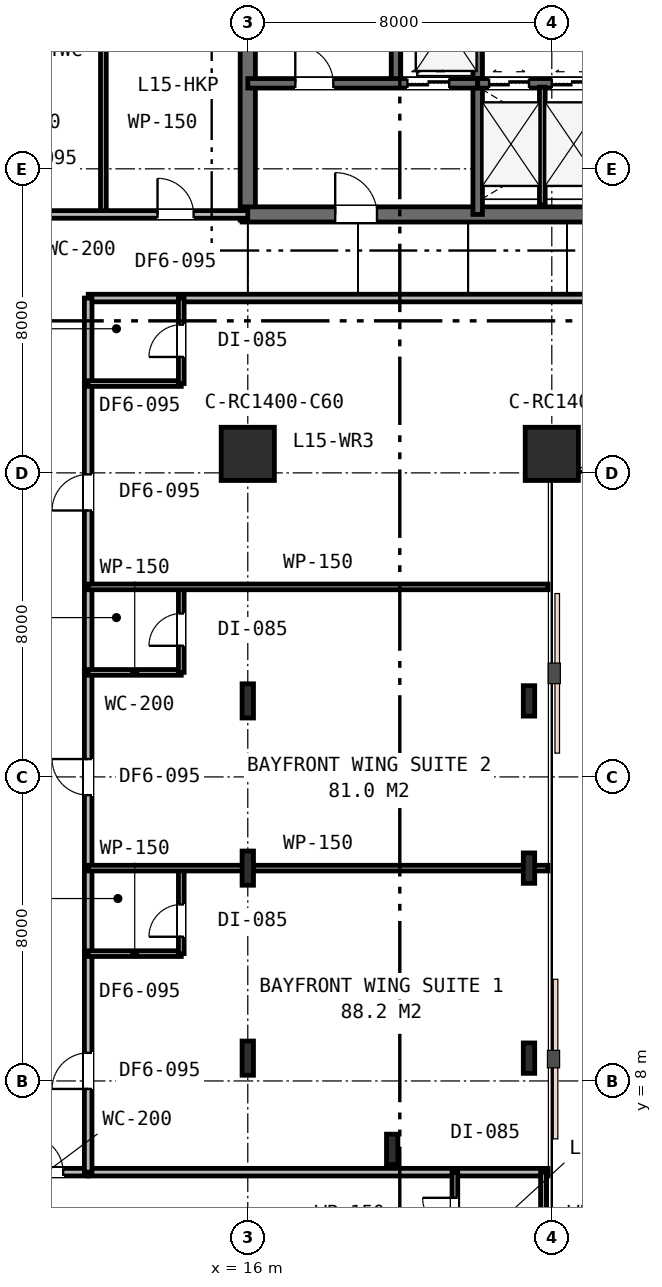
"""IFC4 building model, lengths in metres.
Left out: names, types, materials, properties, quantities, classifications, styles, units other than length and angle.
Written with IfcOpenShell. Run it as: python <this file> out.ifc"""

import sys

from ifc_helpers import new_model, si_unit, direction, frame, frame_2d, origin, origin_2d, place, context, subcontext, project, spatial, rectangle, i_section, extrude, element, fill, save


model = new_model("IFC4")
c1 = context("Model", 3, precision=1e-05, world=origin(), true_north=direction((0.0, 1.0)))
c2 = subcontext(c1, "Body", "Model", "MODEL_VIEW")
j1 = project(units=[si_unit("LENGTHUNIT", "METRE"), si_unit("PLANEANGLEUNIT", "RADIAN")], contexts=[c1])
p1 = place(None, origin())
s1 = spatial("IfcSite", under=j1, at=p1, CompositionType="ELEMENT")
p2 = place(p1, origin())
s2 = spatial("IfcBuilding", under=s1, at=p2, CompositionType="ELEMENT")
p3 = place(p2, frame((0.0, 0.0, 61.8)))
s3 = spatial("IfcBuildingStorey", under=s2, at=p3, CompositionType="ELEMENT", Elevation=61.8)
p4 = place(p3, frame((16.0, 30.65, 0.0), z_axis=(0.0, 0.0, 1.0), x_axis=(0.0, 1.0, 0.0)))
e1 = element("IfcWall", 1, at=p4, inside=s3, PredefinedType="SHEAR", context=c2, shape_type="SweptSolid", body=[
    extrude(rectangle(XDim=12.3, YDim=0.4, at=frame_2d((6.15, 0.0))), origin(), (0.0, 0.0, 1.0), 3.6),
])
p5 = place(p3, frame((15.85, 30.8, 0.0), z_axis=(0.0, 0.0, 1.0), x_axis=(1.0, 0.0, 0.0)))
e2 = element("IfcWall", 2, at=p5, inside=s3, PredefinedType="SHEAR", context=c2, shape_type="SweptSolid", body=[
    extrude(rectangle(XDim=11.2, YDim=0.4, at=frame_2d((5.6, 0.0))), origin(), (0.0, 0.0, 1.0), 3.6),
])
p6 = place(p5, frame((2.45, 0.0, 0.0)))
e3 = element("IfcOpeningElement", 3, at=p6, cuts=e2, PredefinedType="OPENING", context=c2, shape_type="SweptSolid", body=[
    extrude(rectangle(XDim=1.1, YDim=2.15, at=frame_2d((0.55, 1.075))), frame((0.0, 0.21, 0.0), z_axis=(0.0, -1.0, 0.0), x_axis=(1.0, 0.0, 0.0)), (0.0, 0.0, 1.0), 0.42),
])
p7 = place(p3, frame((19.9, 34.25, 0.0), z_axis=(0.0, 0.0, 1.0), x_axis=(0.0, 1.0, 0.0)))
e4 = element("IfcWall", 4, at=p7, inside=s3, PredefinedType="SHEAR", context=c2, shape_type="SweptSolid", body=[
    extrude(rectangle(XDim=8.65, YDim=0.25, at=frame_2d((4.325, 0.0))), origin(), (0.0, 0.0, 1.0), 3.6),
])
p8 = place(p3, frame((22.05, 30.8, 0.0), z_axis=(0.0, 0.0, 1.0), x_axis=(0.0, 1.0, 0.0)))
e5 = element("IfcWall", 5, at=p8, inside=s3, PredefinedType="SHEAR", context=c2, shape_type="SweptSolid", body=[
    extrude(rectangle(XDim=6.45, YDim=0.25, at=frame_2d((3.225, 0.0))), origin(), (0.0, 0.0, 1.0), 3.6),
])
p9 = place(p3, frame((16.0, 34.25, 0.0), z_axis=(0.0, 0.0, 1.0), x_axis=(1.0, 0.0, 0.0)))
e6 = element("IfcWall", 6, at=p9, inside=s3, PredefinedType="SHEAR", context=c2, shape_type="SweptSolid", body=[
    extrude(rectangle(XDim=6.05, YDim=0.25, at=frame_2d((3.025, 0.0))), origin(), (0.0, 0.0, 1.0), 3.6),
])
p10 = place(p9, frame((1.25, 0.0, 0.0)))
e7 = element("IfcOpeningElement", 7, at=p10, cuts=e6, PredefinedType="OPENING", context=c2, shape_type="SweptSolid", body=[
    extrude(rectangle(XDim=1.0, YDim=2.15, at=frame_2d((0.5, 1.075))), frame((0.0, 0.135, 0.0), z_axis=(0.0, -1.0, 0.0), x_axis=(1.0, 0.0, 0.0)), (0.0, 0.0, 1.0), 0.27),
])
p11 = place(p9, frame((4.2, 0.0, 0.0)))
e8 = element("IfcOpeningElement", 8, at=p11, cuts=e6, PredefinedType="OPENING", context=c2, shape_type="SweptSolid", body=[
    extrude(rectangle(XDim=1.1, YDim=2.15, at=frame_2d((0.55, 1.075))), frame((0.0, 0.135, 0.0), z_axis=(0.0, -1.0, 0.0), x_axis=(1.0, 0.0, 0.0)), (0.0, 0.0, 1.0), 0.27),
])
p12 = place(p3, frame((22.05, 34.25, 0.0), z_axis=(0.0, 0.0, 1.0), x_axis=(1.0, 0.0, 0.0)))
e9 = element("IfcWall", 9, at=p12, inside=s3, PredefinedType="SHEAR", context=c2, shape_type="SweptSolid", body=[
    extrude(rectangle(XDim=5.0, YDim=0.25, at=frame_2d((2.5, 0.0))), origin(), (0.0, 0.0, 1.0), 3.6),
])
p13 = place(p12, frame((0.3, 0.0, 0.0)))
e10 = element("IfcOpeningElement", 10, at=p13, cuts=e9, PredefinedType="OPENING", context=c2, shape_type="SweptSolid", body=[
    extrude(rectangle(XDim=1.05, YDim=2.15, at=frame_2d((0.525, 1.075))), frame((0.0, 0.135, 0.0), z_axis=(0.0, -1.0, 0.0), x_axis=(1.0, 0.0, 0.0)), (0.0, 0.0, 1.0), 0.27),
])
p14 = place(p12, frame((1.95, 0.0, 0.0)))
e11 = element("IfcOpeningElement", 11, at=p14, cuts=e9, PredefinedType="OPENING", context=c2, shape_type="SweptSolid", body=[
    extrude(rectangle(XDim=1.05, YDim=2.15, at=frame_2d((0.525, 1.075))), frame((0.0, 0.135, 0.0), z_axis=(0.0, -1.0, 0.0), x_axis=(1.0, 0.0, 0.0)), (0.0, 0.0, 1.0), 0.27),
])
p15 = place(p12, frame((3.6, 0.0, 0.0)))
e12 = element("IfcOpeningElement", 12, at=p15, cuts=e9, PredefinedType="OPENING", context=c2, shape_type="SweptSolid", body=[
    extrude(rectangle(XDim=1.05, YDim=2.15, at=frame_2d((0.525, 1.075))), frame((0.0, 0.135, 0.0), z_axis=(0.0, -1.0, 0.0), x_axis=(1.0, 0.0, 0.0)), (0.0, 0.0, 1.0), 0.27),
])
for number, where, z_axis, x_axis in (
    (13, (16.0, 24.5, 0.0), (0.0, 0.0, 1.0), (1.0, 0.0, 0.0)),
    (14, (24.0, 24.5, 0.0), (0.0, 0.0, 1.0), (1.0, 0.0, 0.0)),
):
    element("IfcColumn", number, at=place(p3, frame(where, z_axis=z_axis, x_axis=x_axis)), inside=s3, PredefinedType="COLUMN", context=c2, shape_type="SweptSolid", body=[
        extrude(rectangle(XDim=1.4, YDim=1.4, at=origin_2d()), origin(), (0.0, 0.0, 1.0), 3.6),
    ])
for number, where, z_axis, x_axis in (
    (15, (19.8, 6.2, 0.0), (0.0, 0.0, 1.0), (1.0, 0.0, 0.0)),
    (16, (23.4, 8.6, 0.0), (0.0, 0.0, 1.0), (1.0, 0.0, 0.0)),
    (17, (23.4, 13.6, 0.0), (0.0, 0.0, 1.0), (1.0, 0.0, 0.0)),
    (18, (23.4, 18.0, 0.0), (0.0, 0.0, 1.0), (1.0, 0.0, 0.0)),
):
    element("IfcColumn", number, at=place(p3, frame(where, z_axis=z_axis, x_axis=x_axis)), inside=s3, PredefinedType="COLUMN", context=c2, shape_type="SweptSolid", body=[
        extrude(i_section(OverallWidth=0.3, OverallDepth=0.8, WebThickness=0.018, FlangeThickness=0.033, FilletRadius=0.03, at=origin_2d()), origin(), (0.0, 0.0, 1.0), 3.6),
    ])
for number, where, z_axis, x_axis in (
    (19, (16.0, 8.6, 0.0), (0.0, 0.0, 1.0), (1.0, 0.0, 0.0)),
    (20, (16.0, 13.6, 0.0), (0.0, 0.0, 1.0), (1.0, 0.0, 0.0)),
    (21, (16.0, 18.0, 0.0), (0.0, 0.0, 1.0), (1.0, 0.0, 0.0)),
):
    element("IfcColumn", number, at=place(p3, frame(where, z_axis=z_axis, x_axis=x_axis)), inside=s3, PredefinedType="COLUMN", context=c2, shape_type="SweptSolid", body=[
        extrude(i_section(OverallWidth=0.3, OverallDepth=0.9, WebThickness=0.018, FlangeThickness=0.035, FilletRadius=0.03, at=origin_2d()), origin(), (0.0, 0.0, 1.0), 3.6),
    ])
p16 = place(p3, frame((23.75, 31.05, 0.0), z_axis=(0.0, 0.0, 1.0), x_axis=(0.0, 1.0, 0.0)))
e22 = element("IfcWall", 22, at=p16, inside=s3, PredefinedType="PLUMBINGWALL", context=c2, shape_type="SweptSolid", body=[
    extrude(rectangle(XDim=3.1, YDim=0.15, at=frame_2d((1.55, 0.0))), origin(), (0.0, 0.0, 1.0), 3.33),
])
p17 = place(p3, frame((11.8, 28.6, 0.0), z_axis=(0.0, 0.0, 1.0), x_axis=(1.0, 0.0, 0.0)))
e23 = element("IfcWall", 23, at=p17, inside=s3, PredefinedType="PARTITIONING", context=c2, shape_type="SweptSolid", body=[
    extrude(rectangle(XDim=38.6, YDim=0.2, at=frame_2d((19.3, 0.0))), origin(), (0.0, 0.0, 1.0), 2.82),
])
p18 = place(p17, frame((14.3, 0.0, 0.0)))
e24 = element("IfcOpeningElement", 24, at=p18, cuts=e23, PredefinedType="OPENING", context=c2, shape_type="SweptSolid", body=[
    extrude(rectangle(XDim=0.95, YDim=2.15, at=frame_2d((0.475, 1.075))), frame((0.0, 0.11, 0.0), z_axis=(0.0, -1.0, 0.0), x_axis=(1.0, 0.0, 0.0)), (0.0, 0.0, 1.0), 0.22),
])
p19 = place(p17, frame((22.075, 0.0, 0.0)))
e25 = element("IfcOpeningElement", 25, at=p19, cuts=e23, PredefinedType="OPENING", context=c2, shape_type="SweptSolid", body=[
    extrude(rectangle(XDim=0.95, YDim=2.15, at=frame_2d((0.475, 1.075))), frame((0.0, 0.11, 0.0), z_axis=(0.0, -1.0, 0.0), x_axis=(1.0, 0.0, 0.0)), (0.0, 0.0, 1.0), 0.22),
])
p20 = place(p17, frame((28.829, 0.0, 0.0)))
e26 = element("IfcOpeningElement", 26, at=p20, cuts=e23, PredefinedType="OPENING", context=c2, shape_type="SweptSolid", body=[
    extrude(rectangle(XDim=0.95, YDim=2.15, at=frame_2d((0.475, 1.075))), frame((0.0, 0.11, 0.0), z_axis=(0.0, -1.0, 0.0), x_axis=(1.0, 0.0, 0.0)), (0.0, 0.0, 1.0), 0.22),
])
p21 = place(p17, frame((34.669, 0.0, 0.0)))
e27 = element("IfcOpeningElement", 27, at=p21, cuts=e23, PredefinedType="OPENING", context=c2, shape_type="SweptSolid", body=[
    extrude(rectangle(XDim=0.95, YDim=2.15, at=frame_2d((0.475, 1.075))), frame((0.0, 0.11, 0.0), z_axis=(0.0, -1.0, 0.0), x_axis=(1.0, 0.0, 0.0)), (0.0, 0.0, 1.0), 0.22),
])
p22 = place(p3, frame((12.2, 30.8, 0.0), z_axis=(0.0, 0.0, 1.0), x_axis=(0.0, 1.0, 0.0)))
e28 = element("IfcWall", 28, at=p22, inside=s3, PredefinedType="PARTITIONING", context=c2, shape_type="SweptSolid", body=[
    extrude(rectangle(XDim=4.8, YDim=0.15, at=frame_2d((2.4, 0.0))), origin(), (0.0, 0.0, 1.0), 2.82),
])
p23 = place(p3, frame((8.3, 30.8, 0.0), z_axis=(0.0, 0.0, 1.0), x_axis=(1.0, 0.0, 0.0)))
e29 = element("IfcWall", 29, at=p23, inside=s3, PredefinedType="PARTITIONING", context=c2, shape_type="SweptSolid", body=[
    extrude(rectangle(XDim=7.7, YDim=0.2, at=frame_2d((3.85, 0.0))), origin(), (0.0, 0.0, 1.0), 2.82),
])
p24 = place(p23, frame((5.325, 0.0, 0.0)))
e30 = element("IfcOpeningElement", 30, at=p24, cuts=e29, PredefinedType="OPENING", context=c2, shape_type="SweptSolid", body=[
    extrude(rectangle(XDim=0.95, YDim=2.15, at=frame_2d((0.475, 1.075))), frame((0.0, 0.11, 0.0), z_axis=(0.0, -1.0, 0.0), x_axis=(1.0, 0.0, 0.0)), (0.0, 0.0, 1.0), 0.22),
])
p25 = place(p3, frame((11.8, 5.6, 0.0), z_axis=(0.0, 0.0, 1.0), x_axis=(1.0, 0.0, 0.0)))
e31 = element("IfcWall", 31, at=p25, inside=s3, PredefinedType="PARTITIONING", context=c2, shape_type="SweptSolid", body=[
    extrude(rectangle(XDim=12.1, YDim=0.2, at=frame_2d((6.05, 0.0))), origin(), (0.0, 0.0, 1.0), 2.82),
])
p26 = place(p3, frame((9.6, 5.6, 0.0), z_axis=(0.0, 0.0, 1.0), x_axis=(1.0, 0.0, 0.0)))
e32 = element("IfcWall", 32, at=p26, inside=s3, PredefinedType="PARTITIONING", context=c2, shape_type="SweptSolid", body=[
    extrude(rectangle(XDim=2.2, YDim=0.2, at=frame_2d((1.1, 0.0))), origin(), (0.0, 0.0, 1.0), 3.33),
])
p27 = place(p26, frame((0.593, 0.0, 0.0)))
e33 = element("IfcOpeningElement", 33, at=p27, cuts=e32, PredefinedType="OPENING", context=c2, shape_type="SweptSolid", body=[
    extrude(rectangle(XDim=0.95, YDim=2.15, at=frame_2d((0.475, 1.075))), frame((0.0, 0.11, 0.0), z_axis=(0.0, -1.0, 0.0), x_axis=(1.0, 0.0, 0.0)), (0.0, 0.0, 1.0), 0.22),
])
p28 = place(p3, frame((21.45, 3.4, 0.0), z_axis=(0.0, 0.0, 1.0), x_axis=(0.0, 1.0, 0.0)))
e34 = element("IfcWall", 34, at=p28, inside=s3, PredefinedType="PARTITIONING", context=c2, shape_type="SweptSolid", body=[
    extrude(rectangle(XDim=2.2, YDim=0.15, at=frame_2d((1.1, 0.0))), origin(), (0.0, 0.0, 1.0), 3.33),
])
p29 = place(p28, frame((0.675, 0.0, 0.0)))
e35 = element("IfcOpeningElement", 35, at=p29, cuts=e34, PredefinedType="OPENING", context=c2, shape_type="SweptSolid", body=[
    extrude(rectangle(XDim=0.85, YDim=2.15, at=frame_2d((0.425, 1.075))), frame((0.0, 0.085, 0.0), z_axis=(0.0, -1.0, 0.0), x_axis=(1.0, 0.0, 0.0)), (0.0, 0.0, 1.0), 0.17),
])
p30 = place(p3, frame((23.78, 5.6, 0.0), z_axis=(0.0, 0.0, 1.0), x_axis=(0.0, -1.0, 0.0)))
e36 = element("IfcWall", 36, at=p30, inside=s3, PredefinedType="PARTITIONING", context=c2, shape_type="SweptSolid", body=[
    extrude(rectangle(XDim=2.22, YDim=0.15, at=frame_2d((1.11, 0.0))), origin(), (0.0, 0.0, 1.0), 3.33),
])
p31 = place(p3, frame((11.8, 5.6, 0.0), z_axis=(0.0, 0.0, 1.0), x_axis=(0.0, 1.0, 0.0)))
e37 = element("IfcWall", 37, at=p31, inside=s3, PredefinedType="PARTITIONING", context=c2, shape_type="SweptSolid", body=[
    extrude(rectangle(XDim=23.0, YDim=0.2, at=frame_2d((11.5, 0.0))), origin(), (0.0, 0.0, 1.0), 2.82),
])
p32 = place(p31, frame((2.19, 0.0, 0.0)))
e38 = element("IfcOpeningElement", 38, at=p32, cuts=e37, PredefinedType="OPENING", context=c2, shape_type="SweptSolid", body=[
    extrude(rectangle(XDim=0.95, YDim=2.15, at=frame_2d((0.475, 1.075))), frame((0.0, 0.11, 0.0), z_axis=(0.0, -1.0, 0.0), x_axis=(1.0, 0.0, 0.0)), (0.0, 0.0, 1.0), 0.22),
])
p33 = place(p31, frame((9.92, 0.0, 0.0)))
e39 = element("IfcOpeningElement", 39, at=p33, cuts=e37, PredefinedType="OPENING", context=c2, shape_type="SweptSolid", body=[
    extrude(rectangle(XDim=0.95, YDim=2.15, at=frame_2d((0.475, 1.075))), frame((0.0, 0.11, 0.0), z_axis=(0.0, -1.0, 0.0), x_axis=(1.0, 0.0, 0.0)), (0.0, 0.0, 1.0), 0.22),
])
p34 = place(p31, frame((17.41, 0.0, 0.0)))
e40 = element("IfcOpeningElement", 40, at=p34, cuts=e37, PredefinedType="OPENING", context=c2, shape_type="SweptSolid", body=[
    extrude(rectangle(XDim=0.95, YDim=2.15, at=frame_2d((0.475, 1.075))), frame((0.0, 0.11, 0.0), z_axis=(0.0, -1.0, 0.0), x_axis=(1.0, 0.0, 0.0)), (0.0, 0.0, 1.0), 0.22),
])
p35 = place(p3, frame((11.8, 11.35, 0.0), z_axis=(0.0, 0.0, 1.0), x_axis=(1.0, 0.0, 0.0)))
e41 = element("IfcWall", 41, at=p35, inside=s3, PredefinedType="PARTITIONING", context=c2, shape_type="SweptSolid", body=[
    extrude(rectangle(XDim=2.45, YDim=0.15, at=frame_2d((1.225, 0.0))), origin(), (0.0, 0.0, 1.0), 2.96),
])
p36 = place(p3, frame((14.25, 11.35, 0.0), z_axis=(0.0, 0.0, 1.0), x_axis=(0.0, 1.0, 0.0)))
e42 = element("IfcWall", 42, at=p36, inside=s3, PredefinedType="PARTITIONING", context=c2, shape_type="SweptSolid", body=[
    extrude(rectangle(XDim=2.25, YDim=0.15, at=frame_2d((1.125, 0.0))), origin(), (0.0, 0.0, 1.0), 2.82),
])
p37 = place(p36, frame((0.444, 0.0, 0.0)))
e43 = element("IfcOpeningElement", 43, at=p37, cuts=e42, PredefinedType="OPENING", context=c2, shape_type="SweptSolid", body=[
    extrude(rectangle(XDim=0.85, YDim=2.15, at=frame_2d((0.425, 1.075))), frame((0.0, 0.085, 0.0), z_axis=(0.0, -1.0, 0.0), x_axis=(1.0, 0.0, 0.0)), (0.0, 0.0, 1.0), 0.17),
])
p38 = place(p3, frame((11.8, 13.6, 0.0), z_axis=(0.0, 0.0, 1.0), x_axis=(1.0, 0.0, 0.0)))
e44 = element("IfcWall", 44, at=p38, inside=s3, PredefinedType="PARTITIONING", context=c2, shape_type="SweptSolid", body=[
    extrude(rectangle(XDim=12.1, YDim=0.15, at=frame_2d((6.05, 0.0))), origin(), (0.0, 0.0, 1.0), 2.82),
])
p39 = place(p3, frame((11.8, 18.75, 0.0), z_axis=(0.0, 0.0, 1.0), x_axis=(1.0, 0.0, 0.0)))
e45 = element("IfcWall", 45, at=p39, inside=s3, PredefinedType="PARTITIONING", context=c2, shape_type="SweptSolid", body=[
    extrude(rectangle(XDim=2.45, YDim=0.15, at=frame_2d((1.225, 0.0))), origin(), (0.0, 0.0, 1.0), 3.33),
])
p40 = place(p3, frame((14.25, 18.75, 0.0), z_axis=(0.0, 0.0, 1.0), x_axis=(0.0, 1.0, 0.0)))
e46 = element("IfcWall", 46, at=p40, inside=s3, PredefinedType="PARTITIONING", context=c2, shape_type="SweptSolid", body=[
    extrude(rectangle(XDim=2.25, YDim=0.15, at=frame_2d((1.125, 0.0))), origin(), (0.0, 0.0, 1.0), 3.33),
])
p41 = place(p40, frame((0.7, 0.0, 0.0)))
e47 = element("IfcOpeningElement", 47, at=p41, cuts=e46, PredefinedType="OPENING", context=c2, shape_type="SweptSolid", body=[
    extrude(rectangle(XDim=0.85, YDim=2.15, at=frame_2d((0.425, 1.075))), frame((0.0, 0.085, 0.0), z_axis=(0.0, -1.0, 0.0), x_axis=(1.0, 0.0, 0.0)), (0.0, 0.0, 1.0), 0.17),
])
p42 = place(p3, frame((11.8, 21.0, 0.0), z_axis=(0.0, 0.0, 1.0), x_axis=(1.0, 0.0, 0.0)))
e48 = element("IfcWall", 48, at=p42, inside=s3, PredefinedType="PARTITIONING", context=c2, shape_type="SweptSolid", body=[
    extrude(rectangle(XDim=12.1, YDim=0.15, at=frame_2d((6.05, 0.0))), origin(), (0.0, 0.0, 1.0), 2.82),
])
p43 = place(p3, frame((11.8, 26.35, 0.0), z_axis=(0.0, 0.0, 1.0), x_axis=(1.0, 0.0, 0.0)))
e49 = element("IfcWall", 49, at=p43, inside=s3, PredefinedType="PARTITIONING", context=c2, shape_type="SweptSolid", body=[
    extrude(rectangle(XDim=2.45, YDim=0.15, at=frame_2d((1.225, 0.0))), origin(), (0.0, 0.0, 1.0), 3.33),
])
p44 = place(p3, frame((14.25, 26.35, 0.0), z_axis=(0.0, 0.0, 1.0), x_axis=(0.0, 1.0, 0.0)))
e50 = element("IfcWall", 50, at=p44, inside=s3, PredefinedType="PARTITIONING", context=c2, shape_type="SweptSolid", body=[
    extrude(rectangle(XDim=2.25, YDim=0.15, at=frame_2d((1.125, 0.0))), origin(), (0.0, 0.0, 1.0), 3.33),
])
p45 = place(p44, frame((0.7, 0.0, 0.0)))
e51 = element("IfcOpeningElement", 51, at=p45, cuts=e50, PredefinedType="OPENING", context=c2, shape_type="SweptSolid", body=[
    extrude(rectangle(XDim=0.85, YDim=2.15, at=frame_2d((0.425, 1.075))), frame((0.0, 0.085, 0.0), z_axis=(0.0, -1.0, 0.0), x_axis=(1.0, 0.0, 0.0)), (0.0, 0.0, 1.0), 0.17),
])
p46 = place(p10, origin())
e52 = element("IfcDoor", 52, at=p46, inside=s3, OperationType="SINGLE_SWING_LEFT", PredefinedType="DOOR", context=c2, shape_type="SweptSolid", body=[
    extrude(rectangle(XDim=1.0, YDim=2.15, at=frame_2d((0.5, 1.075))), frame((0.0, 0.025, 0.0), z_axis=(0.0, -1.0, 0.0), x_axis=(1.0, 0.0, 0.0)), (0.0, 0.0, 1.0), 0.05),
])
fill(e7, e52)
p47 = place(p6, origin())
e53 = element("IfcDoor", 53, at=p47, inside=s3, OperationType="SINGLE_SWING_LEFT", PredefinedType="DOOR", context=c2, shape_type="SweptSolid", body=[
    extrude(rectangle(XDim=1.1, YDim=2.15, at=frame_2d((0.55, 1.075))), frame((0.0, 0.025, 0.0), z_axis=(0.0, -1.0, 0.0), x_axis=(1.0, 0.0, 0.0)), (0.0, 0.0, 1.0), 0.05),
])
fill(e3, e53)
p48 = place(p24, origin())
e54 = element("IfcDoor", 54, at=p48, inside=s3, OperationType="SINGLE_SWING_LEFT", PredefinedType="DOOR", context=c2, shape_type="SweptSolid", body=[
    extrude(rectangle(XDim=0.95, YDim=2.15, at=frame_2d((0.475, 1.075))), frame((0.0, 0.025, 0.0), z_axis=(0.0, -1.0, 0.0), x_axis=(1.0, 0.0, 0.0)), (0.0, 0.0, 1.0), 0.05),
])
fill(e30, e54)
p49 = place(p27, origin())
e55 = element("IfcDoor", 55, at=p49, inside=s3, OperationType="SINGLE_SWING_LEFT", PredefinedType="DOOR", context=c2, shape_type="SweptSolid", body=[
    extrude(rectangle(XDim=0.95, YDim=2.15, at=frame_2d((0.475, 1.075))), frame((0.0, 0.025, 0.0), z_axis=(0.0, -1.0, 0.0), x_axis=(1.0, 0.0, 0.0)), (0.0, 0.0, 1.0), 0.05),
])
fill(e33, e55)
p50 = place(p29, origin())
e56 = element("IfcDoor", 56, at=p50, inside=s3, OperationType="SINGLE_SWING_RIGHT", PredefinedType="DOOR", context=c2, shape_type="SweptSolid", body=[
    extrude(rectangle(XDim=0.85, YDim=2.15, at=frame_2d((0.425, 1.075))), frame((0.0, 0.025, 0.0), z_axis=(0.0, -1.0, 0.0), x_axis=(1.0, 0.0, 0.0)), (0.0, 0.0, 1.0), 0.05),
])
fill(e35, e56)
p51 = place(p32, origin())
e57 = element("IfcDoor", 57, at=p51, inside=s3, OperationType="SINGLE_SWING_LEFT", PredefinedType="DOOR", context=c2, shape_type="SweptSolid", body=[
    extrude(rectangle(XDim=0.95, YDim=2.15, at=frame_2d((0.475, 1.075))), frame((0.0, 0.025, 0.0), z_axis=(0.0, -1.0, 0.0), x_axis=(1.0, 0.0, 0.0)), (0.0, 0.0, 1.0), 0.05),
])
fill(e38, e57)
p52 = place(p37, origin())
e58 = element("IfcDoor", 58, at=p52, inside=s3, OperationType="SINGLE_SWING_LEFT", PredefinedType="DOOR", context=c2, shape_type="SweptSolid", body=[
    extrude(rectangle(XDim=0.85, YDim=2.15, at=frame_2d((0.425, 1.075))), frame((0.0, 0.025, 0.0), z_axis=(0.0, -1.0, 0.0), x_axis=(1.0, 0.0, 0.0)), (0.0, 0.0, 1.0), 0.05),
])
fill(e43, e58)
p53 = place(p33, origin())
e59 = element("IfcDoor", 59, at=p53, inside=s3, OperationType="SINGLE_SWING_RIGHT", PredefinedType="DOOR", context=c2, shape_type="SweptSolid", body=[
    extrude(rectangle(XDim=0.95, YDim=2.15, at=frame_2d((0.475, 1.075))), frame((0.0, 0.025, 0.0), z_axis=(0.0, -1.0, 0.0), x_axis=(1.0, 0.0, 0.0)), (0.0, 0.0, 1.0), 0.05),
])
fill(e39, e59)
p54 = place(p41, origin())
e60 = element("IfcDoor", 60, at=p54, inside=s3, OperationType="SINGLE_SWING_LEFT", PredefinedType="DOOR", context=c2, shape_type="SweptSolid", body=[
    extrude(rectangle(XDim=0.85, YDim=2.15, at=frame_2d((0.425, 1.075))), frame((0.0, 0.025, 0.0), z_axis=(0.0, -1.0, 0.0), x_axis=(1.0, 0.0, 0.0)), (0.0, 0.0, 1.0), 0.05),
])
fill(e47, e60)
p55 = place(p34, origin())
e61 = element("IfcDoor", 61, at=p55, inside=s3, OperationType="SINGLE_SWING_LEFT", PredefinedType="DOOR", context=c2, shape_type="SweptSolid", body=[
    extrude(rectangle(XDim=0.95, YDim=2.15, at=frame_2d((0.475, 1.075))), frame((0.0, 0.025, 0.0), z_axis=(0.0, -1.0, 0.0), x_axis=(1.0, 0.0, 0.0)), (0.0, 0.0, 1.0), 0.05),
])
fill(e40, e61)
p56 = place(p45, origin())
e62 = element("IfcDoor", 62, at=p56, inside=s3, OperationType="SINGLE_SWING_LEFT", PredefinedType="DOOR", context=c2, shape_type="SweptSolid", body=[
    extrude(rectangle(XDim=0.85, YDim=2.15, at=frame_2d((0.425, 1.075))), frame((0.0, 0.025, 0.0), z_axis=(0.0, -1.0, 0.0), x_axis=(1.0, 0.0, 0.0)), (0.0, 0.0, 1.0), 0.05),
])
fill(e51, e62)
p57 = place(p11, origin())
e63 = element("IfcDoor", 63, at=p57, inside=s3, OperationType="DOUBLE_DOOR_SLIDING", PredefinedType="DOOR", context=c2, shape_type="SweptSolid", body=[
    extrude(rectangle(XDim=1.1, YDim=2.15, at=frame_2d((0.55, 1.075))), frame((0.0, 0.025, 0.0), z_axis=(0.0, -1.0, 0.0), x_axis=(1.0, 0.0, 0.0)), (0.0, 0.0, 1.0), 0.05),
])
fill(e8, e63)
p58 = place(p13, origin())
e64 = element("IfcDoor", 64, at=p58, inside=s3, OperationType="DOUBLE_DOOR_SLIDING", PredefinedType="DOOR", context=c2, shape_type="SweptSolid", body=[
    extrude(rectangle(XDim=1.05, YDim=2.15, at=frame_2d((0.525, 1.075))), frame((0.0, 0.025, 0.0), z_axis=(0.0, -1.0, 0.0), x_axis=(1.0, 0.0, 0.0)), (0.0, 0.0, 1.0), 0.05),
])
fill(e10, e64)
p59 = place(p14, origin())
e65 = element("IfcDoor", 65, at=p59, inside=s3, OperationType="DOUBLE_DOOR_SLIDING", PredefinedType="DOOR", context=c2, shape_type="SweptSolid", body=[
    extrude(rectangle(XDim=1.05, YDim=2.15, at=frame_2d((0.525, 1.075))), frame((0.0, 0.025, 0.0), z_axis=(0.0, -1.0, 0.0), x_axis=(1.0, 0.0, 0.0)), (0.0, 0.0, 1.0), 0.05),
])
fill(e11, e65)
save(model, sys.argv[1])
